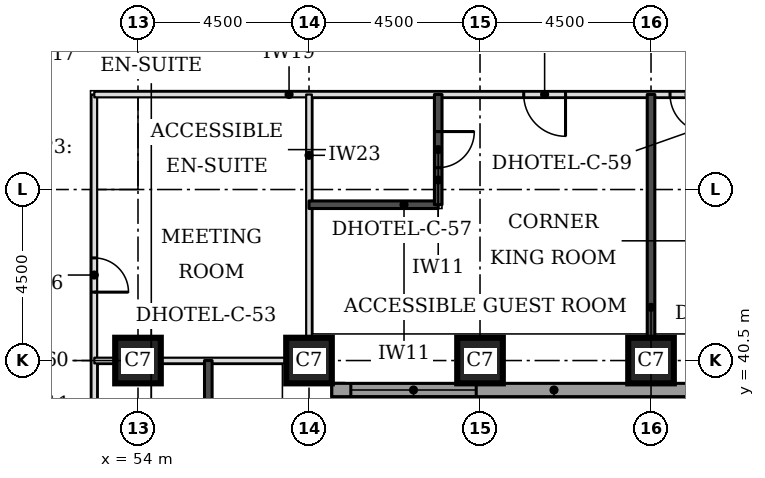
"""IFC4 building model, lengths in metres.
Left out: names, types, materials, properties, quantities, classifications, styles, units other than length and angle.
Written with IfcOpenShell. Run it as: python <this file> out.ifc"""

import sys

from ifc_helpers import new_model, si_unit, direction, frame, frame_2d, origin, origin_2d, place, context, subcontext, project, spatial, rectangle, extrude, element, fill, save


model = new_model("IFC4")
c1 = context("Model", 3, precision=1e-05, world=origin(), true_north=direction((0.0, 1.0)))
c2 = subcontext(c1, "Body", "Model", "MODEL_VIEW")
j1 = project(units=[si_unit("LENGTHUNIT", "METRE"), si_unit("PLANEANGLEUNIT", "RADIAN")], contexts=[c1])
p1 = place(None, origin())
s1 = spatial("IfcSite", under=j1, at=p1, CompositionType="ELEMENT")
p2 = place(p1, origin())
s2 = spatial("IfcBuilding", under=s1, at=p2, CompositionType="ELEMENT")
p3 = place(p2, frame((0.0, 0.0, 56.1)))
s3 = spatial("IfcBuildingStorey", under=s2, at=p3, CompositionType="ELEMENT", Elevation=56.1)
for number, where, z_axis, x_axis in (
    (1, (54.0, 40.5, 0.0), (0.0, 0.0, 1.0), (1.0, 0.0, 0.0)),
    (2, (58.5, 40.5, 0.0), (0.0, 0.0, 1.0), (1.0, 0.0, 0.0)),
    (3, (63.0, 40.5, 0.0), (0.0, 0.0, 1.0), (1.0, 0.0, 0.0)),
    (4, (67.5, 40.5, 0.0), (0.0, 0.0, 1.0), (1.0, 0.0, 0.0)),
):
    element("IfcColumn", number, at=place(p3, frame(where, z_axis=z_axis, x_axis=x_axis)), inside=s3, PredefinedType="COLUMN", context=c2, shape_type="SweptSolid", body=[
        extrude(rectangle(XDim=1.2, YDim=1.2, at=origin_2d()), origin(), (0.0, 0.0, 1.0), 3.3),
    ])
p4 = place(p3, frame((59.275, 22.106, 0.0), z_axis=(0.0, 0.0, 1.0), x_axis=(0.0, 1.0, 0.0)))
e5 = element("IfcWall", 5, at=p4, inside=s3, PredefinedType="STANDARD", context=c2, shape_type="SweptSolid", body=[
    extrude(rectangle(XDim=17.793, YDim=0.35, at=frame_2d((8.897, 0.0))), origin(), (0.0, 0.0, 1.0), 3.055),
])
p5 = place(p4, frame((5.493, 0.0, 0.8)))
e6 = element("IfcOpeningElement", 6, at=p5, cuts=e5, PredefinedType="OPENING", context=c2, shape_type="SweptSolid", body=[
    extrude(rectangle(XDim=3.3, YDim=1.5, at=frame_2d((1.65, 0.75))), frame((0.0, 0.185, 0.0), z_axis=(0.0, -1.0, 0.0), x_axis=(1.0, 0.0, 0.0)), (0.0, 0.0, 1.0), 0.37),
])
p6 = place(p4, frame((13.993, 0.0, 0.8)))
e7 = element("IfcOpeningElement", 7, at=p6, cuts=e5, PredefinedType="OPENING", context=c2, shape_type="SweptSolid", body=[
    extrude(rectangle(XDim=3.3, YDim=1.5, at=frame_2d((1.65, 0.75))), frame((0.0, 0.185, 0.0), z_axis=(0.0, -1.0, 0.0), x_axis=(1.0, 0.0, 0.0)), (0.0, 0.0, 1.0), 0.37),
])
p7 = place(p3, frame((59.1, 39.725, 0.0), z_axis=(0.0, 0.0, 1.0), x_axis=(1.0, 0.0, 0.0)))
e8 = element("IfcWall", 8, at=p7, inside=s3, PredefinedType="STANDARD", context=c2, shape_type="SweptSolid", body=[
    extrude(rectangle(XDim=13.293, YDim=0.35, at=frame_2d((6.647, 0.0))), origin(), (0.0, 0.0, 1.0), 3.055),
])
p8 = place(p7, frame((0.5, 0.0, 0.8)))
e9 = element("IfcOpeningElement", 9, at=p8, cuts=e8, PredefinedType="OPENING", context=c2, shape_type="SweptSolid", body=[
    extrude(rectangle(XDim=3.3, YDim=1.5, at=frame_2d((1.65, 0.75))), frame((0.0, 0.185, 0.0), z_axis=(0.0, -1.0, 0.0), x_axis=(1.0, 0.0, 0.0)), (0.0, 0.0, 1.0), 0.37),
])
p9 = place(p3, frame((52.85, 25.15, 0.0), z_axis=(0.0, 0.0, 1.0), x_axis=(0.0, 1.0, 0.0)))
e10 = element("IfcWall", 10, at=p9, inside=s3, PredefinedType="PARTITIONING", context=c2, shape_type="SweptSolid", body=[
    extrude(rectangle(XDim=22.35, YDim=0.15, at=frame_2d((11.175, 0.0))), origin(), (0.0, 0.0, 1.0), 3.08),
])
p10 = place(p9, frame((0.347, 0.0, 0.0)))
e11 = element("IfcOpeningElement", 11, at=p10, cuts=e10, PredefinedType="OPENING", context=c2, shape_type="SweptSolid", body=[
    extrude(rectangle(XDim=1.0, YDim=2.1, at=frame_2d((0.5, 1.05))), frame((0.0, 0.085, 0.0), z_axis=(0.0, -1.0, 0.0), x_axis=(1.0, 0.0, 0.0)), (0.0, 0.0, 1.0), 0.17),
])
p11 = place(p9, frame((7.075, 0.0, 0.0)))
e12 = element("IfcOpeningElement", 12, at=p11, cuts=e10, PredefinedType="OPENING", context=c2, shape_type="SweptSolid", body=[
    extrude(rectangle(XDim=1.0, YDim=2.1, at=frame_2d((0.5, 1.05))), frame((0.0, 0.085, 0.0), z_axis=(0.0, -1.0, 0.0), x_axis=(1.0, 0.0, 0.0)), (0.0, 0.0, 1.0), 0.17),
])
p12 = place(p9, frame((11.425, 0.0, 0.0)))
e13 = element("IfcOpeningElement", 13, at=p12, cuts=e10, PredefinedType="OPENING", context=c2, shape_type="SweptSolid", body=[
    extrude(rectangle(XDim=1.0, YDim=2.1, at=frame_2d((0.5, 1.05))), frame((0.0, 0.085, 0.0), z_axis=(0.0, -1.0, 0.0), x_axis=(1.0, 0.0, 0.0)), (0.0, 0.0, 1.0), 0.17),
])
p13 = place(p9, frame((17.15, 0.0, 0.0)))
e14 = element("IfcOpeningElement", 14, at=p13, cuts=e10, PredefinedType="OPENING", context=c2, shape_type="SweptSolid", body=[
    extrude(rectangle(XDim=0.9, YDim=2.1, at=frame_2d((0.45, 1.05))), frame((0.0, 0.085, 0.0), z_axis=(0.0, -1.0, 0.0), x_axis=(1.0, 0.0, 0.0)), (0.0, 0.0, 1.0), 0.17),
])
p14 = place(p3, frame((52.85, 47.5, 0.0), z_axis=(0.0, 0.0, 1.0), x_axis=(1.0, 0.0, 0.0)))
e15 = element("IfcWall", 15, at=p14, inside=s3, PredefinedType="PARTITIONING", context=c2, shape_type="SweptSolid", body=[
    extrude(rectangle(XDim=16.65, YDim=0.15, at=frame_2d((8.325, 0.0))), origin(), (0.0, 0.0, 1.0), 3.08),
])
p15 = place(p14, frame((11.3, 0.0, 0.0)))
e16 = element("IfcOpeningElement", 16, at=p15, cuts=e15, PredefinedType="OPENING", context=c2, shape_type="SweptSolid", body=[
    extrude(rectangle(XDim=1.1, YDim=2.1, at=frame_2d((0.55, 1.05))), frame((0.0, 0.085, 0.0), z_axis=(0.0, -1.0, 0.0), x_axis=(1.0, 0.0, 0.0)), (0.0, 0.0, 1.0), 0.17),
])
p16 = place(p14, frame((15.15, 0.0, 0.0)))
e17 = element("IfcOpeningElement", 17, at=p16, cuts=e15, PredefinedType="OPENING", context=c2, shape_type="SweptSolid", body=[
    extrude(rectangle(XDim=1.0, YDim=2.1, at=frame_2d((0.5, 1.05))), frame((0.0, 0.085, 0.0), z_axis=(0.0, -1.0, 0.0), x_axis=(1.0, 0.0, 0.0)), (0.0, 0.0, 1.0), 0.17),
])
p17 = place(p3, frame((55.85, 38.15, 0.0), z_axis=(0.0, 0.0, 1.0), x_axis=(0.0, 1.0, 0.0)))
e18 = element("IfcWall", 18, at=p17, inside=s3, PredefinedType="SOLIDWALL", context=c2, shape_type="SweptSolid", body=[
    extrude(rectangle(XDim=2.35, YDim=0.2, at=frame_2d((1.175, 0.0))), origin(), (0.0, 0.0, 1.0), 3.08),
])
p18 = place(p3, frame((67.5, 41.1, 0.0), z_axis=(0.0, 0.0, 1.0), x_axis=(0.0, 1.0, 0.0)))
e19 = element("IfcWall", 19, at=p18, inside=s3, PredefinedType="SOLIDWALL", context=c2, shape_type="SweptSolid", body=[
    extrude(rectangle(XDim=6.4, YDim=0.2, at=frame_2d((3.2, 0.0))), origin(), (0.0, 0.0, 1.0), 3.08),
])
p19 = place(p3, frame((58.5, 44.6, 0.0), z_axis=(0.0, 0.0, 1.0), x_axis=(1.0, 0.0, 0.0)))
e20 = element("IfcWall", 20, at=p19, inside=s3, PredefinedType="SOLIDWALL", context=c2, shape_type="SweptSolid", body=[
    extrude(rectangle(XDim=3.4, YDim=0.2, at=frame_2d((1.7, 0.0))), origin(), (0.0, 0.0, 1.0), 3.08),
])
p20 = place(p3, frame((61.9, 44.6, 0.0), z_axis=(0.0, 0.0, 1.0), x_axis=(0.0, 1.0, 0.0)))
e21 = element("IfcWall", 21, at=p20, inside=s3, PredefinedType="SOLIDWALL", context=c2, shape_type="SweptSolid", body=[
    extrude(rectangle(XDim=2.9, YDim=0.2, at=frame_2d((1.45, 0.0))), origin(), (0.0, 0.0, 1.0), 3.08),
])
p21 = place(p20, frame((0.975, 0.0, 0.0)))
e22 = element("IfcOpeningElement", 22, at=p21, cuts=e21, PredefinedType="OPENING", context=c2, shape_type="SweptSolid", body=[
    extrude(rectangle(XDim=0.95, YDim=2.1, at=frame_2d((0.475, 1.05))), frame((0.0, 0.11, 0.0), z_axis=(0.0, -1.0, 0.0), x_axis=(1.0, 0.0, 0.0)), (0.0, 0.0, 1.0), 0.22),
])
p22 = place(p3, frame((52.85, 40.5, 0.0), z_axis=(0.0, 0.0, 1.0), x_axis=(1.0, 0.0, 0.0)))
e23 = element("IfcWall", 23, at=p22, inside=s3, PredefinedType="PARTITIONING", context=c2, shape_type="SweptSolid", body=[
    extrude(rectangle(XDim=5.05, YDim=0.15, at=frame_2d((2.525, 0.0))), origin(), (0.0, 0.0, 1.0), 2.33),
])
p23 = place(p3, frame((58.5, 41.1, 0.0), z_axis=(0.0, 0.0, 1.0), x_axis=(0.0, 1.0, 0.0)))
e24 = element("IfcWall", 24, at=p23, inside=s3, PredefinedType="PARTITIONING", context=c2, shape_type="SweptSolid", body=[
    extrude(rectangle(XDim=6.4, YDim=0.15, at=frame_2d((3.2, 0.0))), origin(), (0.0, 0.0, 1.0), 3.08),
])
p24 = place(p8, origin())
e25 = element("IfcWindow", 25, at=p24, inside=s3, PartitioningType="SINGLE_PANEL", PredefinedType="WINDOW", context=c2, shape_type="SweptSolid", body=[
    extrude(rectangle(XDim=3.3, YDim=1.5, at=frame_2d((1.65, 0.75))), frame((0.0, 0.085, 0.0), z_axis=(0.0, -1.0, 0.0), x_axis=(1.0, 0.0, 0.0)), (0.0, 0.0, 1.0), 0.06),
])
fill(e9, e25)
p25 = place(p15, frame((1.1, 0.0, 0.0), z_axis=(0.0, 0.0, 1.0), x_axis=(-1.0, 0.0, 0.0)))
e26 = element("IfcDoor", 26, at=p25, inside=s3, OperationType="SINGLE_SWING_LEFT", PredefinedType="DOOR", context=c2, shape_type="SweptSolid", body=[
    extrude(rectangle(XDim=1.1, YDim=2.1, at=frame_2d((0.55, 1.05))), frame((0.0, 0.025, 0.0), z_axis=(0.0, -1.0, 0.0), x_axis=(1.0, 0.0, 0.0)), (0.0, 0.0, 1.0), 0.05),
])
fill(e16, e26)
p26 = place(p21, frame((0.95, 0.0, 0.0), z_axis=(0.0, 0.0, 1.0), x_axis=(-1.0, 0.0, 0.0)))
e27 = element("IfcDoor", 27, at=p26, inside=s3, OperationType="SINGLE_SWING_LEFT", PredefinedType="DOOR", context=c2, shape_type="SweptSolid", body=[
    extrude(rectangle(XDim=0.95, YDim=2.1, at=frame_2d((0.475, 1.05))), frame((0.0, 0.025, 0.0), z_axis=(0.0, -1.0, 0.0), x_axis=(1.0, 0.0, 0.0)), (0.0, 0.0, 1.0), 0.05),
])
fill(e22, e27)
p27 = place(p16, frame((1.0, 0.0, 0.0), z_axis=(0.0, 0.0, 1.0), x_axis=(-1.0, 0.0, 0.0)))
e28 = element("IfcDoor", 28, at=p27, inside=s3, OperationType="SINGLE_SWING_LEFT", PredefinedType="DOOR", context=c2, shape_type="SweptSolid", body=[
    extrude(rectangle(XDim=1.0, YDim=2.1, at=frame_2d((0.5, 1.05))), frame((0.0, 0.025, 0.0), z_axis=(0.0, -1.0, 0.0), x_axis=(1.0, 0.0, 0.0)), (0.0, 0.0, 1.0), 0.05),
])
fill(e17, e28)
p28 = place(p13, frame((0.9, 0.0, 0.0), z_axis=(0.0, 0.0, 1.0), x_axis=(-1.0, 0.0, 0.0)))
e29 = element("IfcDoor", 29, at=p28, inside=s3, OperationType="SINGLE_SWING_RIGHT", PredefinedType="DOOR", context=c2, shape_type="SweptSolid", body=[
    extrude(rectangle(XDim=0.9, YDim=2.1, at=frame_2d((0.45, 1.05))), frame((0.0, 0.025, 0.0), z_axis=(0.0, -1.0, 0.0), x_axis=(1.0, 0.0, 0.0)), (0.0, 0.0, 1.0), 0.05),
])
fill(e14, e29)
save(model, sys.argv[1])
